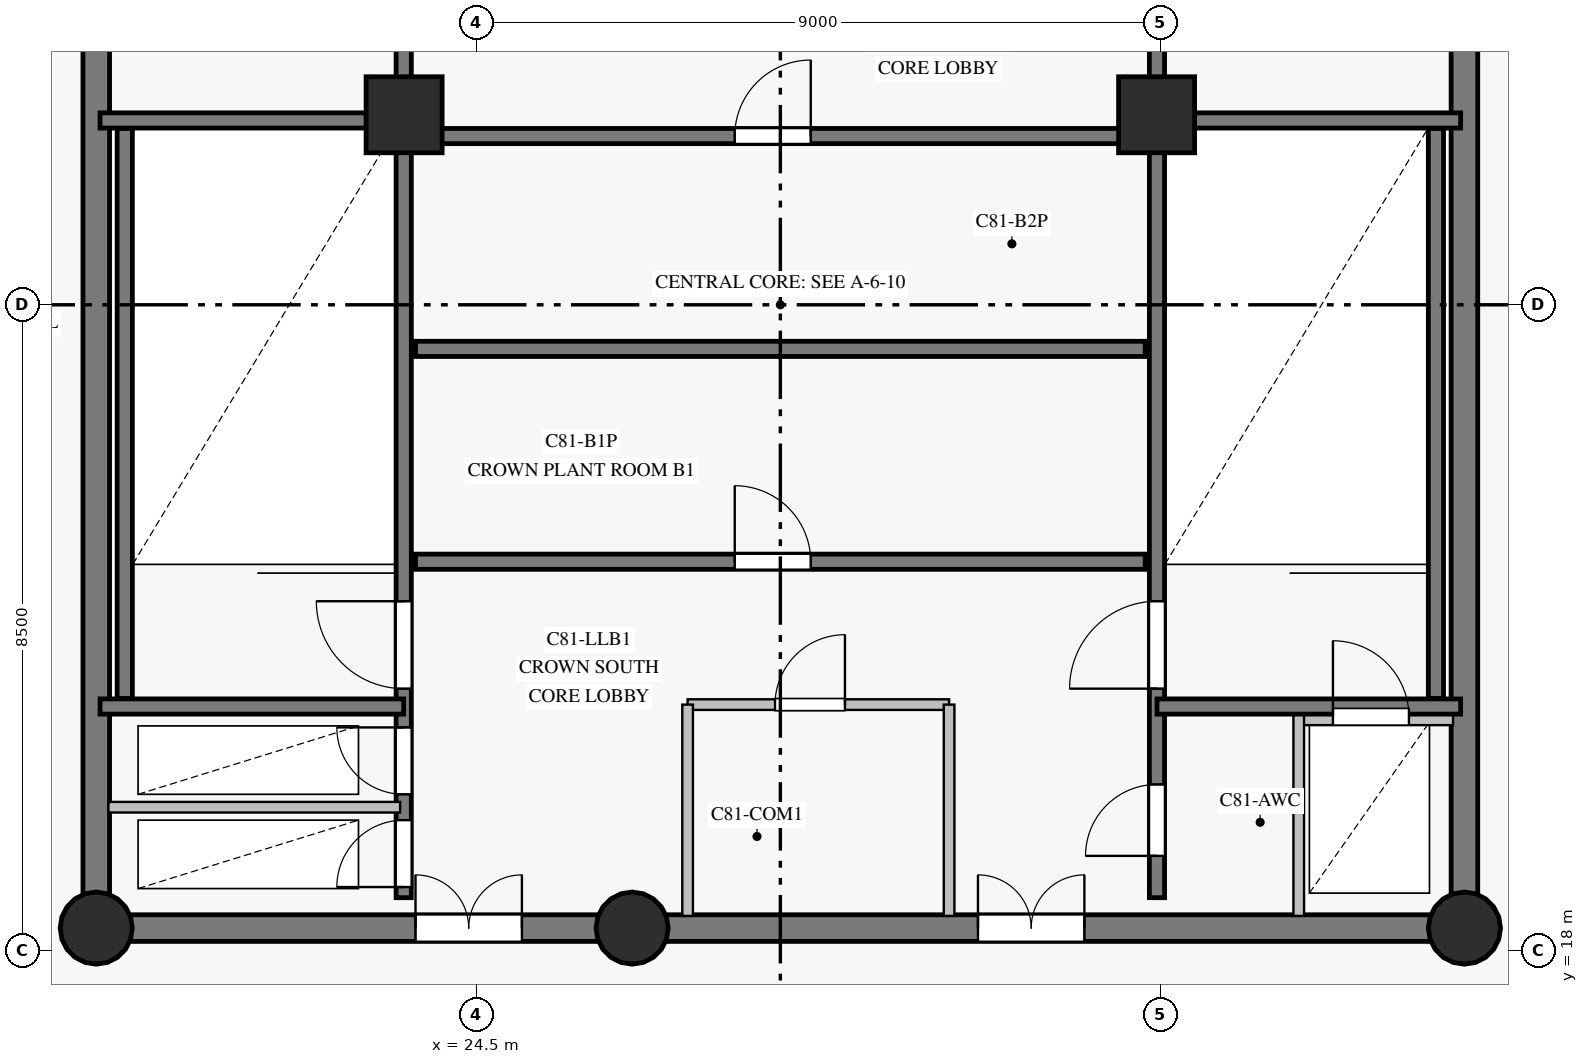
"""IFC4 building model, lengths in metres.
Left out: names, types, materials, properties, quantities, classifications, styles, units other than length and angle.
Written with IfcOpenShell. Run it as: python <this file> out.ifc"""

import sys

from ifc_helpers import new_model, si_unit, direction, frame, frame_2d, origin, origin_with_axes, origin_2d, place, context, subcontext, project, spatial, rectangle, circle, extrude, source, transform, mapped, element, fill, save


model = new_model("IFC4")
c1 = context("Model", 3, precision=1e-05, world=origin(), true_north=direction((0.0, 1.0)))
c2 = subcontext(c1, "Body", "Model", "MODEL_VIEW")
j1 = project(units=[si_unit("LENGTHUNIT", "METRE"), si_unit("PLANEANGLEUNIT", "RADIAN")], contexts=[c1])
p1 = place(None, origin())
s1 = spatial("IfcSite", under=j1, at=p1, CompositionType="ELEMENT")
p2 = place(p1, origin())
s2 = spatial("IfcBuilding", under=s1, at=p2, CompositionType="ELEMENT")
p3 = place(p2, frame((0.0, 0.0, 273.4)))
s3 = spatial("IfcBuildingStorey", under=s2, at=p3, CompositionType="ELEMENT", Elevation=273.4)
p4 = place(p3, frame((19.5, 18.3, 0.0), z_axis=(0.0, 0.0, 1.0), x_axis=(1.0, 0.0, 0.0)))
e1 = element("IfcWall", 1, at=p4, inside=s3, PredefinedType="SHEAR", context=c2, shape_type="SweptSolid", body=[
    extrude(rectangle(XDim=7.05, YDim=0.35, at=frame_2d((3.525, 0.0))), origin(), (0.0, 0.0, 1.0), 16.35),
])
p5 = place(p4, frame((4.2, 0.0, 0.0)))
e2 = element("IfcOpeningElement", 2, at=p5, cuts=e1, PredefinedType="OPENING", context=c2, shape_type="SweptSolid", body=[
    extrude(rectangle(XDim=1.4, YDim=2.2, at=frame_2d((0.7, 1.1))), frame((0.0, 0.185, 0.0), z_axis=(0.0, -1.0, 0.0), x_axis=(1.0, 0.0, 0.0)), (0.0, 0.0, 1.0), 0.37),
])
p6 = place(p3, frame((26.55, 18.3, 0.0), z_axis=(0.0, 0.0, 1.0), x_axis=(1.0, 0.0, 0.0)))
e3 = element("IfcWall", 3, at=p6, inside=s3, PredefinedType="SHEAR", context=c2, shape_type="SweptSolid", body=[
    extrude(rectangle(XDim=10.95, YDim=0.35, at=frame_2d((5.475, 0.0))), origin(), (0.0, 0.0, 1.0), 16.35),
])
p7 = place(p6, frame((4.55, 0.0, 0.0)))
e4 = element("IfcOpeningElement", 4, at=p7, cuts=e3, PredefinedType="OPENING", context=c2, shape_type="SweptSolid", body=[
    extrude(rectangle(XDim=1.4, YDim=2.2, at=frame_2d((0.7, 1.1))), frame((0.0, 0.185, 0.0), z_axis=(0.0, -1.0, 0.0), x_axis=(1.0, 0.0, 0.0)), (0.0, 0.0, 1.0), 0.37),
])
p8 = place(p3, frame((37.5, 18.3, 0.0), z_axis=(0.0, 0.0, 1.0), x_axis=(0.0, 1.0, 0.0)))
e5 = element("IfcWall", 5, at=p8, inside=s3, PredefinedType="SHEAR", context=c2, shape_type="SweptSolid", body=[
    extrude(rectangle(XDim=16.4, YDim=0.35, at=frame_2d((8.2, 0.0))), origin(), (0.0, 0.0, 1.0), 16.35),
])
p9 = place(p3, frame((19.5, 34.7, 0.0), z_axis=(0.0, 0.0, 1.0), x_axis=(0.0, -1.0, 0.0)))
e6 = element("IfcWall", 6, at=p9, inside=s3, PredefinedType="SHEAR", context=c2, shape_type="SweptSolid", body=[
    extrude(rectangle(XDim=16.4, YDim=0.35, at=frame_2d((8.2, 0.0))), origin(), (0.0, 0.0, 1.0), 16.35),
])
p10 = place(p9, frame((3.1, 0.0, 0.0)))
e7 = element("IfcOpeningElement", 7, at=p10, cuts=e6, PredefinedType="OPENING", context=c2, shape_type="SweptSolid", body=[
    extrude(rectangle(XDim=1.1, YDim=2.15, at=frame_2d((0.55, 1.075))), frame((0.0, 0.185, 0.0), z_axis=(0.0, -1.0, 0.0), x_axis=(1.0, 0.0, 0.0)), (0.0, 0.0, 1.0), 0.37),
])
m1 = source(origin_with_axes(), c2, "Body", "SweptSolid", [
    extrude(circle(Radius=0.475, at=origin_2d()), origin(), (0.0, 0.0, 1.0), 16.6),
])
for number, where, z_axis, x_axis in (
    (8, (19.5, 18.3, 0.0), (0.0, 0.0, 1.0), (1.0, 0.0, 0.0)),
    (9, (26.55, 18.3, 0.0), (0.0, 0.0, 1.0), (1.0, 0.0, 0.0)),
    (10, (37.5, 18.3, 0.0), (0.0, 0.0, 1.0), (1.0, 0.0, 0.0)),
):
    element("IfcColumn", number, at=place(p3, frame(where, z_axis=z_axis, x_axis=x_axis)), inside=s3, PredefinedType="COLUMN", context=c2, shape_type="MappedRepresentation", body=[
        mapped(m1, transform((0.0, 0.0, 0.0), scale=1.0)),
    ])
m2 = source(origin_with_axes(), c2, "Body", "SweptSolid", [
    extrude(rectangle(XDim=1.0, YDim=1.0, at=origin_2d()), origin(), (0.0, 0.0, 1.0), 16.6),
])
for number, where, z_axis, x_axis in (
    (11, (23.55, 29.0, 0.0), (0.0, 0.0, 1.0), (1.0, 0.0, 0.0)),
    (12, (33.45, 29.0, 0.0), (0.0, 0.0, 1.0), (1.0, 0.0, 0.0)),
):
    element("IfcColumn", number, at=place(p3, frame(where, z_axis=z_axis, x_axis=x_axis)), inside=s3, PredefinedType="COLUMN", context=c2, shape_type="MappedRepresentation", body=[
        mapped(m2, transform((0.0, 0.0, 0.0), scale=1.0)),
    ])
p11 = place(p3, frame((35.32, 21.08, 0.0), z_axis=(0.0, 0.0, 1.0), x_axis=(1.0, 0.0, 0.0)))
e13 = element("IfcWall", 13, at=p11, inside=s3, PredefinedType="SHEAR", context=c2, shape_type="SweptSolid", body=[
    extrude(rectangle(XDim=2.03, YDim=0.22, at=frame_2d((1.015, 0.0))), origin(), (0.0, 0.0, 1.0), 2.45),
])
p12 = place(p11, frame((0.45, 0.0, 0.0)))
e14 = element("IfcOpeningElement", 14, at=p12, cuts=e13, PredefinedType="OPENING", context=c2, shape_type="SweptSolid", body=[
    extrude(rectangle(XDim=1.0, YDim=2.05, at=frame_2d((0.5, 1.025))), frame((0.0, 0.12, 0.0), z_axis=(0.0, -1.0, 0.0), x_axis=(1.0, 0.0, 0.0)), (0.0, 0.0, 1.0), 0.24),
])
p13 = place(p3, frame((23.545, 18.7, 0.0), z_axis=(0.0, 0.0, 1.0), x_axis=(0.0, 1.0, 0.0)))
e15 = element("IfcWall", 15, at=p13, inside=s3, PredefinedType="SHEAR", context=c2, shape_type="SweptSolid", body=[
    extrude(rectangle(XDim=15.6, YDim=0.2, at=frame_2d((7.8, 0.0))), origin(), (0.0, 0.0, 1.0), 16.35),
])
p14 = place(p13, frame((2.75, 0.0, 0.0)))
e16 = element("IfcOpeningElement", 16, at=p14, cuts=e15, PredefinedType="OPENING", context=c2, shape_type="SweptSolid", body=[
    extrude(rectangle(XDim=1.15, YDim=2.15, at=frame_2d((0.575, 1.075))), frame((0.0, 0.11, 0.0), z_axis=(0.0, -1.0, 0.0), x_axis=(1.0, 0.0, 0.0)), (0.0, 0.0, 1.0), 0.22),
])
p15 = place(p13, frame((0.14, 0.0, 0.0)))
e17 = element("IfcOpeningElement", 17, at=p15, cuts=e15, PredefinedType="OPENING", context=c2, shape_type="SweptSolid", body=[
    extrude(rectangle(XDim=0.88, YDim=2.1, at=frame_2d((0.44, 1.05))), frame((0.0, 0.11, 0.0), z_axis=(0.0, -1.0, 0.0), x_axis=(1.0, 0.0, 0.0)), (0.0, 0.0, 1.0), 0.22),
])
p16 = place(p13, frame((1.36, 0.0, 0.0)))
e18 = element("IfcOpeningElement", 18, at=p16, cuts=e15, PredefinedType="OPENING", context=c2, shape_type="SweptSolid", body=[
    extrude(rectangle(XDim=0.88, YDim=2.1, at=frame_2d((0.44, 1.05))), frame((0.0, 0.11, 0.0), z_axis=(0.0, -1.0, 0.0), x_axis=(1.0, 0.0, 0.0)), (0.0, 0.0, 1.0), 0.22),
])
p17 = place(p13, frame((12.1, 0.0, 0.0)))
e19 = element("IfcOpeningElement", 19, at=p17, cuts=e15, PredefinedType="OPENING", context=c2, shape_type="SweptSolid", body=[
    extrude(rectangle(XDim=1.12, YDim=2.15, at=frame_2d((0.56, 1.075))), frame((0.0, 0.11, 0.0), z_axis=(0.0, -1.0, 0.0), x_axis=(1.0, 0.0, 0.0)), (0.0, 0.0, 1.0), 0.22),
])
p18 = place(p13, frame((14.05, 0.0, 0.0)))
e20 = element("IfcOpeningElement", 20, at=p18, cuts=e15, PredefinedType="OPENING", context=c2, shape_type="SweptSolid", body=[
    extrude(rectangle(XDim=1.12, YDim=2.15, at=frame_2d((0.56, 1.075))), frame((0.0, 0.11, 0.0), z_axis=(0.0, -1.0, 0.0), x_axis=(1.0, 0.0, 0.0)), (0.0, 0.0, 1.0), 0.22),
])
p19 = place(p3, frame((33.455, 18.7, 0.0), z_axis=(0.0, 0.0, 1.0), x_axis=(0.0, 1.0, 0.0)))
e21 = element("IfcWall", 21, at=p19, inside=s3, PredefinedType="SHEAR", context=c2, shape_type="SweptSolid", body=[
    extrude(rectangle(XDim=15.6, YDim=0.2, at=frame_2d((7.8, 0.0))), origin(), (0.0, 0.0, 1.0), 16.35),
])
p20 = place(p19, frame((2.75, 0.0, 0.0)))
e22 = element("IfcOpeningElement", 22, at=p20, cuts=e21, PredefinedType="OPENING", context=c2, shape_type="SweptSolid", body=[
    extrude(rectangle(XDim=1.15, YDim=2.15, at=frame_2d((0.575, 1.075))), frame((0.0, 0.11, 0.0), z_axis=(0.0, -1.0, 0.0), x_axis=(1.0, 0.0, 0.0)), (0.0, 0.0, 1.0), 0.22),
])
p21 = place(p19, frame((0.55, 0.0, 0.0)))
e23 = element("IfcOpeningElement", 23, at=p21, cuts=e21, PredefinedType="OPENING", context=c2, shape_type="SweptSolid", body=[
    extrude(rectangle(XDim=0.94, YDim=2.1, at=frame_2d((0.47, 1.05))), frame((0.0, 0.11, 0.0), z_axis=(0.0, -1.0, 0.0), x_axis=(1.0, 0.0, 0.0)), (0.0, 0.0, 1.0), 0.22),
])
p22 = place(p19, frame((11.98, 0.0, 0.0)))
e24 = element("IfcOpeningElement", 24, at=p22, cuts=e21, PredefinedType="OPENING", context=c2, shape_type="SweptSolid", body=[
    extrude(rectangle(XDim=0.86, YDim=2.04, at=frame_2d((0.43, 1.02))), frame((0.0, 0.11, 0.0), z_axis=(0.0, -1.0, 0.0), x_axis=(1.0, 0.0, 0.0)), (0.0, 0.0, 1.0), 0.22),
])
p23 = place(p3, frame((23.7, 23.12, 0.0), z_axis=(0.0, 0.0, 1.0), x_axis=(1.0, 0.0, 0.0)))
e25 = element("IfcWall", 25, at=p23, inside=s3, PredefinedType="SHEAR", context=c2, shape_type="SweptSolid", body=[
    extrude(rectangle(XDim=9.6, YDim=0.2, at=frame_2d((4.8, 0.0))), origin(), (0.0, 0.0, 1.0), 16.35),
])
p24 = place(p23, frame((4.2, 0.0, 0.0)))
e26 = element("IfcOpeningElement", 26, at=p24, cuts=e25, PredefinedType="OPENING", context=c2, shape_type="SweptSolid", body=[
    extrude(rectangle(XDim=1.0, YDim=2.15, at=frame_2d((0.5, 1.075))), frame((0.0, 0.11, 0.0), z_axis=(0.0, -1.0, 0.0), x_axis=(1.0, 0.0, 0.0)), (0.0, 0.0, 1.0), 0.22),
])
p25 = place(p3, frame((23.7, 25.92, 0.0), z_axis=(0.0, 0.0, 1.0), x_axis=(1.0, 0.0, 0.0)))
e27 = element("IfcWall", 27, at=p25, inside=s3, PredefinedType="SHEAR", context=c2, shape_type="SweptSolid", body=[
    extrude(rectangle(XDim=9.6, YDim=0.2, at=frame_2d((4.8, 0.0))), origin(), (0.0, 0.0, 1.0), 16.35),
])
p26 = place(p3, frame((23.7, 28.72, 0.0), z_axis=(0.0, 0.0, 1.0), x_axis=(1.0, 0.0, 0.0)))
e28 = element("IfcWall", 28, at=p26, inside=s3, PredefinedType="SHEAR", context=c2, shape_type="SweptSolid", body=[
    extrude(rectangle(XDim=9.6, YDim=0.2, at=frame_2d((4.8, 0.0))), origin(), (0.0, 0.0, 1.0), 16.35),
])
p27 = place(p26, frame((4.2, 0.0, 0.0)))
e29 = element("IfcOpeningElement", 29, at=p27, cuts=e28, PredefinedType="OPENING", context=c2, shape_type="SweptSolid", body=[
    extrude(rectangle(XDim=1.0, YDim=2.15, at=frame_2d((0.5, 1.075))), frame((0.0, 0.11, 0.0), z_axis=(0.0, -1.0, 0.0), x_axis=(1.0, 0.0, 0.0)), (0.0, 0.0, 1.0), 0.22),
])
for number, where, z_axis, x_axis in (
    (30, (19.875, 21.32, 0.0), (0.0, 0.0, 1.0), (0.0, 1.0, 0.0)),
    (31, (37.125, 21.32, 0.0), (0.0, 0.0, 1.0), (0.0, 1.0, 0.0)),
):
    element("IfcWall", number, at=place(p3, frame(where, z_axis=z_axis, x_axis=x_axis)), inside=s3, PredefinedType="SHEAR", context=c2, shape_type="SweptSolid", body=[
        extrude(rectangle(XDim=7.5, YDim=0.2, at=frame_2d((3.75, 0.0))), origin(), (0.0, 0.0, 1.0), 16.35),
    ])
for number, where, z_axis, x_axis in (
    (32, (33.455, 21.215, 0.0), (0.0, 0.0, 1.0), (1.0, 0.0, 0.0)),
    (33, (33.455, 28.925, 0.0), (0.0, 0.0, 1.0), (1.0, 0.0, 0.0)),
    (34, (19.55, 21.215, 0.0), (0.0, 0.0, 1.0), (1.0, 0.0, 0.0)),
    (35, (19.55, 28.925, 0.0), (0.0, 0.0, 1.0), (1.0, 0.0, 0.0)),
):
    element("IfcWall", number, at=place(p3, frame(where, z_axis=z_axis, x_axis=x_axis)), inside=s3, PredefinedType="SHEAR", context=c2, shape_type="SweptSolid", body=[
        extrude(rectangle(XDim=3.995, YDim=0.2, at=frame_2d((1.998, 0.0))), origin(), (0.0, 0.0, 1.0), 16.35),
    ])
p28 = place(p3, frame((19.66, 19.89, 0.0), z_axis=(0.0, 0.0, 1.0), x_axis=(1.0, 0.0, 0.0)))
e36 = element("IfcWall", 36, at=p28, inside=s3, PredefinedType="PARTITIONING", context=c2, shape_type="SweptSolid", body=[
    extrude(rectangle(XDim=3.837, YDim=0.14, at=frame_2d((1.919, 0.0))), origin(), (0.0, 0.0, 1.0), 16.35),
])
p29 = place(p3, frame((27.28, 21.24, 0.0), z_axis=(0.0, 0.0, 1.0), x_axis=(1.0, 0.0, 0.0)))
e37 = element("IfcWall", 37, at=p29, inside=s3, PredefinedType="PARTITIONING", context=c2, shape_type="SweptSolid", body=[
    extrude(rectangle(XDim=3.44, YDim=0.14, at=frame_2d((1.72, 0.0))), origin(), (0.0, 0.0, 1.0), 16.35),
])
p30 = place(p29, frame((1.15, 0.0, 0.0)))
e38 = element("IfcOpeningElement", 38, at=p30, cuts=e37, PredefinedType="OPENING", context=c2, shape_type="SweptSolid", body=[
    extrude(rectangle(XDim=0.92, YDim=2.1, at=frame_2d((0.46, 1.05))), frame((0.0, 0.08, 0.0), z_axis=(0.0, -1.0, 0.0), x_axis=(1.0, 0.0, 0.0)), (0.0, 0.0, 1.0), 0.16),
])
for number, where, z_axis, x_axis in (
    (39, (27.28, 18.46, 0.0), (0.0, 0.0, 1.0), (0.0, 1.0, 0.0)),
    (40, (30.72, 18.46, 0.0), (0.0, 0.0, 1.0), (0.0, 1.0, 0.0)),
):
    element("IfcWall", number, at=place(p3, frame(where, z_axis=z_axis, x_axis=x_axis)), inside=s3, PredefinedType="PARTITIONING", context=c2, shape_type="SweptSolid", body=[
        extrude(rectangle(XDim=2.78, YDim=0.14, at=frame_2d((1.39, 0.0))), origin(), (0.0, 0.0, 1.0), 16.35),
    ])
p31 = place(p3, frame((35.32, 18.46, 0.0), z_axis=(0.0, 0.0, 1.0), x_axis=(0.0, 1.0, 0.0)))
e41 = element("IfcWall", 41, at=p31, inside=s3, PredefinedType="PARTITIONING", context=c2, shape_type="SweptSolid", body=[
    extrude(rectangle(XDim=2.64, YDim=0.14, at=frame_2d((1.32, 0.0))), origin(), (0.0, 0.0, 1.0), 16.35),
])
m3 = source(origin_with_axes(), c2, "Body", "SweptSolid", [
    extrude(rectangle(XDim=1.0, YDim=2.05, at=frame_2d((0.5, 1.025))), frame((0.0, 0.025, 0.0), z_axis=(0.0, -1.0, 0.0), x_axis=(1.0, 0.0, 0.0)), (0.0, 0.0, 1.0), 0.05),
])
p32 = place(p12, origin())
e42 = element("IfcDoor", 42, at=p32, inside=s3, OperationType="SINGLE_SWING_LEFT", PredefinedType="TRAPDOOR", context=c2, shape_type="MappedRepresentation", body=[
    mapped(m3, transform((0.0, 0.0, 0.0), scale=1.0)),
])
fill(e14, e42)
m4 = source(origin_with_axes(), c2, "Body", "SweptSolid", [
    extrude(rectangle(XDim=1.15, YDim=2.15, at=frame_2d((0.575, 1.075))), frame((0.0, 0.025, 0.0), z_axis=(0.0, -1.0, 0.0), x_axis=(1.0, 0.0, 0.0)), (0.0, 0.0, 1.0), 0.05),
])
p33 = place(p14, origin())
e43 = element("IfcDoor", 43, at=p33, inside=s3, OperationType="SINGLE_SWING_RIGHT", PredefinedType="DOOR", context=c2, shape_type="MappedRepresentation", body=[
    mapped(m4, transform((0.0, 0.0, 0.0), scale=1.0)),
])
fill(e16, e43)
p34 = place(p20, origin())
e44 = element("IfcDoor", 44, at=p34, inside=s3, OperationType="SINGLE_SWING_LEFT", PredefinedType="DOOR", context=c2, shape_type="MappedRepresentation", body=[
    mapped(m4, transform((0.0, 0.0, 0.0), scale=1.0)),
])
fill(e22, e44)
m5 = source(origin_with_axes(), c2, "Body", "SweptSolid", [
    extrude(rectangle(XDim=0.88, YDim=2.1, at=frame_2d((0.44, 1.05))), frame((0.0, 0.025, 0.0), z_axis=(0.0, -1.0, 0.0), x_axis=(1.0, 0.0, 0.0)), (0.0, 0.0, 1.0), 0.05),
])
p35 = place(p15, origin())
e45 = element("IfcDoor", 45, at=p35, inside=s3, OperationType="SINGLE_SWING_LEFT", PredefinedType="DOOR", context=c2, shape_type="MappedRepresentation", body=[
    mapped(m5, transform((0.0, 0.0, 0.0), scale=1.0)),
])
fill(e17, e45)
p36 = place(p16, origin())
e46 = element("IfcDoor", 46, at=p36, inside=s3, OperationType="SINGLE_SWING_RIGHT", PredefinedType="DOOR", context=c2, shape_type="MappedRepresentation", body=[
    mapped(m5, transform((0.0, 0.0, 0.0), scale=1.0)),
])
fill(e18, e46)
m6 = source(origin_with_axes(), c2, "Body", "SweptSolid", [
    extrude(rectangle(XDim=1.4, YDim=2.2, at=frame_2d((0.7, 1.1))), frame((0.0, 0.025, 0.0), z_axis=(0.0, -1.0, 0.0), x_axis=(1.0, 0.0, 0.0)), (0.0, 0.0, 1.0), 0.05),
])
p37 = place(p5, origin())
e47 = element("IfcDoor", 47, at=p37, inside=s3, OperationType="DOUBLE_DOOR_SINGLE_SWING", PredefinedType="DOOR", context=c2, shape_type="MappedRepresentation", body=[
    mapped(m6, transform((0.0, 0.0, 0.0), scale=1.0)),
])
fill(e2, e47)
p38 = place(p7, origin())
e48 = element("IfcDoor", 48, at=p38, inside=s3, OperationType="DOUBLE_DOOR_SINGLE_SWING", PredefinedType="DOOR", context=c2, shape_type="MappedRepresentation", body=[
    mapped(m6, transform((0.0, 0.0, 0.0), scale=1.0)),
])
fill(e4, e48)
m7 = source(origin_with_axes(), c2, "Body", "SweptSolid", [
    extrude(rectangle(XDim=0.94, YDim=2.1, at=frame_2d((0.47, 1.05))), frame((0.0, 0.025, 0.0), z_axis=(0.0, -1.0, 0.0), x_axis=(1.0, 0.0, 0.0)), (0.0, 0.0, 1.0), 0.05),
])
p39 = place(p21, origin())
e49 = element("IfcDoor", 49, at=p39, inside=s3, OperationType="SINGLE_SWING_LEFT", PredefinedType="DOOR", context=c2, shape_type="MappedRepresentation", body=[
    mapped(m7, transform((0.0, 0.0, 0.0), scale=1.0)),
])
fill(e23, e49)
m8 = source(origin_with_axes(), c2, "Body", "SweptSolid", [
    extrude(rectangle(XDim=0.92, YDim=2.1, at=frame_2d((0.46, 1.05))), frame((0.0, 0.025, 0.0), z_axis=(0.0, -1.0, 0.0), x_axis=(1.0, 0.0, 0.0)), (0.0, 0.0, 1.0), 0.05),
])
p40 = place(p30, origin())
e50 = element("IfcDoor", 50, at=p40, inside=s3, OperationType="SINGLE_SWING_RIGHT", PredefinedType="DOOR", context=c2, shape_type="MappedRepresentation", body=[
    mapped(m8, transform((0.0, 0.0, 0.0), scale=1.0)),
])
fill(e38, e50)
m9 = source(origin_with_axes(), c2, "Body", "SweptSolid", [
    extrude(rectangle(XDim=1.0, YDim=2.15, at=frame_2d((0.5, 1.075))), frame((0.0, 0.025, 0.0), z_axis=(0.0, -1.0, 0.0), x_axis=(1.0, 0.0, 0.0)), (0.0, 0.0, 1.0), 0.05),
])
p41 = place(p24, origin())
e51 = element("IfcDoor", 51, at=p41, inside=s3, OperationType="SINGLE_SWING_LEFT", PredefinedType="DOOR", context=c2, shape_type="MappedRepresentation", body=[
    mapped(m9, transform((0.0, 0.0, 0.0), scale=1.0)),
])
fill(e26, e51)
p42 = place(p27, origin())
e52 = element("IfcDoor", 52, at=p42, inside=s3, OperationType="SINGLE_SWING_RIGHT", PredefinedType="DOOR", context=c2, shape_type="MappedRepresentation", body=[
    mapped(m9, transform((0.0, 0.0, 0.0), scale=1.0)),
])
fill(e29, e52)
save(model, sys.argv[1])
